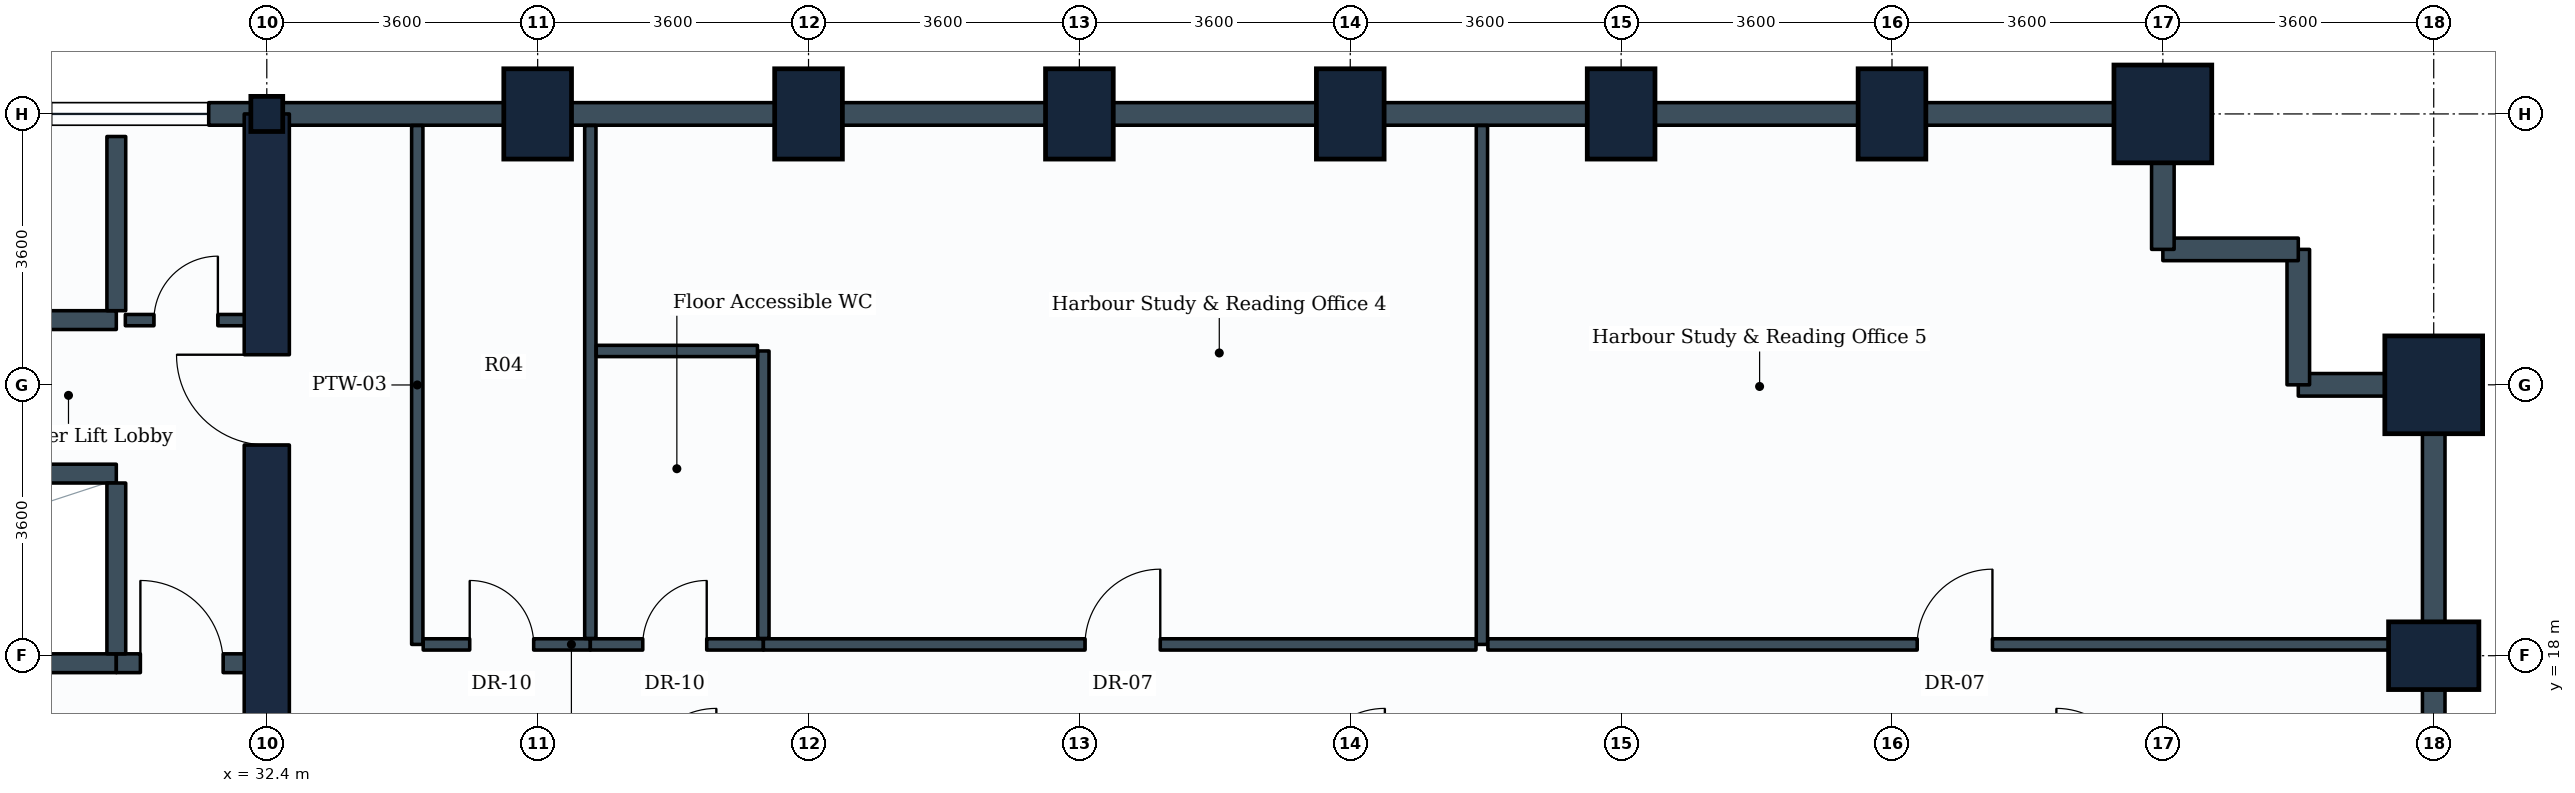
"""IFC4 building model, lengths in metres.
Left out: names, types, materials, properties, quantities, classifications, styles, units other than length and angle.
Written with IfcOpenShell. Run it as: python <this file> out.ifc"""

import sys

from ifc_helpers import new_model, si_unit, direction, frame, frame_2d, origin, origin_2d, place, context, subcontext, project, spatial, rectangle, i_section, extrude, element, fill, save


model = new_model("IFC4")
c1 = context("Model", 3, precision=1e-05, world=origin(), true_north=direction((0.0, 1.0)))
c2 = subcontext(c1, "Body", "Model", "MODEL_VIEW")
j1 = project(units=[si_unit("LENGTHUNIT", "METRE"), si_unit("PLANEANGLEUNIT", "RADIAN")], contexts=[c1])
p1 = place(None, origin())
s1 = spatial("IfcSite", under=j1, at=p1, CompositionType="ELEMENT")
p2 = place(p1, origin())
s2 = spatial("IfcBuilding", under=s1, at=p2, CompositionType="ELEMENT")
p3 = place(p2, frame((0.0, 0.0, 66.9)))
s3 = spatial("IfcBuildingStorey", under=s2, at=p3, CompositionType="ELEMENT", Elevation=66.9)
p4 = place(p3, frame((32.4, 25.2, 0.0), z_axis=(0.0, 0.0, 1.0), x_axis=(1.0, 0.0, 0.0)))
e1 = element("IfcColumn", 1, at=p4, inside=s3, PredefinedType="COLUMN", context=c2, shape_type="SweptSolid", body=[
    extrude(i_section(OverallWidth=0.424, OverallDepth=0.467, WebThickness=0.033, FlangeThickness=0.053, FilletRadius=0.015, at=origin_2d()), origin(), (0.0, 0.0, 1.0), 3.9),
])
for number, where, z_axis, x_axis in (
    (2, (36.0, 25.2, 0.0), (0.0, 0.0, 1.0), (1.0, 0.0, 0.0)),
    (3, (39.6, 25.2, 0.0), (0.0, 0.0, 1.0), (1.0, 0.0, 0.0)),
    (4, (43.2, 25.2, 0.0), (0.0, 0.0, 1.0), (1.0, 0.0, 0.0)),
    (5, (46.8, 25.2, 0.0), (0.0, 0.0, 1.0), (1.0, 0.0, 0.0)),
    (6, (50.4, 25.2, 0.0), (0.0, 0.0, 1.0), (1.0, 0.0, 0.0)),
    (7, (54.0, 25.2, 0.0), (0.0, 0.0, 1.0), (1.0, 0.0, 0.0)),
):
    element("IfcColumn", number, at=place(p3, frame(where, z_axis=z_axis, x_axis=x_axis)), inside=s3, PredefinedType="COLUMN", context=c2, shape_type="SweptSolid", body=[
        extrude(rectangle(XDim=0.9, YDim=1.2, at=origin_2d()), origin(), (0.0, 0.0, 1.0), 3.9),
    ])
p5 = place(p3, frame((57.6, 25.2, 0.0), z_axis=(0.0, 0.0, 1.0), x_axis=(1.0, 0.0, 0.0)))
e8 = element("IfcColumn", 8, at=p5, inside=s3, PredefinedType="COLUMN", context=c2, shape_type="SweptSolid", body=[
    extrude(rectangle(XDim=1.3, YDim=1.3, at=origin_2d()), origin(), (0.0, 0.0, 1.0), 3.9),
])
p6 = place(p3, frame((61.2, 18.0, 0.0), z_axis=(0.0, 0.0, 1.0), x_axis=(0.0, 1.0, 0.0)))
e9 = element("IfcColumn", 9, at=p6, inside=s3, PredefinedType="COLUMN", context=c2, shape_type="SweptSolid", body=[
    extrude(rectangle(XDim=0.9, YDim=1.2, at=origin_2d()), origin(), (0.0, 0.0, 1.0), 3.9),
])
p7 = place(p3, frame((61.2, 21.6, 0.0), z_axis=(0.0, 0.0, 1.0), x_axis=(0.0, 1.0, 0.0)))
e10 = element("IfcColumn", 10, at=p7, inside=s3, PredefinedType="COLUMN", context=c2, shape_type="SweptSolid", body=[
    extrude(rectangle(XDim=1.3, YDim=1.3, at=origin_2d()), origin(), (0.0, 0.0, 1.0), 3.9),
])
for number, where, z_axis, x_axis in (
    (11, (61.2, 18.0, 0.0), (0.0, 0.0, 1.0), (0.0, -1.0, 0.0)),
    (12, (61.2, 21.6, 0.0), (0.0, 0.0, 1.0), (0.0, -1.0, 0.0)),
):
    element("IfcWall", number, at=place(p3, frame(where, z_axis=z_axis, x_axis=x_axis)), inside=s3, PredefinedType="STANDARD", context=c2, shape_type="SweptSolid", body=[
        extrude(rectangle(XDim=3.6, YDim=0.3, at=frame_2d((1.8, 0.0))), origin(), (0.0, 0.0, 1.0), 2.93),
    ])
p8 = place(p3, frame((61.2, 21.6, 0.0), z_axis=(0.0, 0.0, 1.0), x_axis=(-1.0, 0.0, 0.0)))
e13 = element("IfcWall", 13, at=p8, inside=s3, PredefinedType="STANDARD", context=c2, shape_type="SweptSolid", body=[
    extrude(rectangle(XDim=1.8, YDim=0.3, at=frame_2d((0.9, 0.0))), origin(), (0.0, 0.0, 1.0), 2.93),
])
for number, where, z_axis, x_axis in (
    (14, (59.4, 23.4, 0.0), (0.0, 0.0, 1.0), (0.0, -1.0, 0.0)),
    (15, (57.6, 23.4, 0.0), (0.0, 0.0, 1.0), (1.0, 0.0, 0.0)),
):
    element("IfcWall", number, at=place(p3, frame(where, z_axis=z_axis, x_axis=x_axis)), inside=s3, PredefinedType="STANDARD", context=c2, shape_type="SweptSolid", body=[
        extrude(rectangle(XDim=1.8, YDim=0.3, at=frame_2d((0.9, 0.0))), origin(), (0.0, 0.0, 1.0), 3.635),
    ])
p9 = place(p3, frame((57.6, 25.2, 0.0), z_axis=(0.0, 0.0, 1.0), x_axis=(0.0, -1.0, 0.0)))
e16 = element("IfcWall", 16, at=p9, inside=s3, PredefinedType="STANDARD", context=c2, shape_type="SweptSolid", body=[
    extrude(rectangle(XDim=1.8, YDim=0.3, at=frame_2d((0.9, 0.0))), origin(), (0.0, 0.0, 1.0), 2.93),
])
for number, where, z_axis, x_axis in (
    (17, (54.0, 25.2, 0.0), (0.0, 0.0, 1.0), (1.0, 0.0, 0.0)),
    (18, (50.4, 25.2, 0.0), (0.0, 0.0, 1.0), (1.0, 0.0, 0.0)),
):
    element("IfcWall", number, at=place(p3, frame(where, z_axis=z_axis, x_axis=x_axis)), inside=s3, PredefinedType="STANDARD", context=c2, shape_type="SweptSolid", body=[
        extrude(rectangle(XDim=3.6, YDim=0.3, at=frame_2d((1.8, 0.0))), origin(), (0.0, 0.0, 1.0), 2.93),
    ])
p10 = place(p3, frame((46.8, 25.2, 0.0), z_axis=(0.0, 0.0, 1.0), x_axis=(1.0, 0.0, 0.0)))
e19 = element("IfcWall", 19, at=p10, inside=s3, PredefinedType="STANDARD", context=c2, shape_type="SweptSolid", body=[
    extrude(rectangle(XDim=3.6, YDim=0.3, at=frame_2d((1.8, 0.0))), origin(), (0.0, 0.0, 1.0), 2.93),
])
p11 = place(p3, frame((43.2, 25.2, 0.0), z_axis=(0.0, 0.0, 1.0), x_axis=(1.0, 0.0, 0.0)))
e20 = element("IfcWall", 20, at=p11, inside=s3, PredefinedType="STANDARD", context=c2, shape_type="SweptSolid", body=[
    extrude(rectangle(XDim=3.6, YDim=0.3, at=frame_2d((1.8, 0.0))), origin(), (0.0, 0.0, 1.0), 2.93),
])
p12 = place(p3, frame((39.6, 25.2, 0.0), z_axis=(0.0, 0.0, 1.0), x_axis=(1.0, 0.0, 0.0)))
e21 = element("IfcWall", 21, at=p12, inside=s3, PredefinedType="STANDARD", context=c2, shape_type="SweptSolid", body=[
    extrude(rectangle(XDim=3.6, YDim=0.3, at=frame_2d((1.8, 0.0))), origin(), (0.0, 0.0, 1.0), 2.93),
])
for number, where, z_axis, x_axis in (
    (22, (36.0, 25.2, 0.0), (0.0, 0.0, 1.0), (1.0, 0.0, 0.0)),
    (23, (32.4, 25.2, 0.0), (0.0, 0.0, 1.0), (1.0, 0.0, 0.0)),
):
    element("IfcWall", number, at=place(p3, frame(where, z_axis=z_axis, x_axis=x_axis)), inside=s3, PredefinedType="STANDARD", context=c2, shape_type="SweptSolid", body=[
        extrude(rectangle(XDim=3.6, YDim=0.3, at=frame_2d((1.8, 0.0))), origin(), (0.0, 0.0, 1.0), 2.93),
    ])
p13 = place(p3, frame((28.8, 25.2, 0.0), z_axis=(0.0, 0.0, 1.0), x_axis=(1.0, 0.0, 0.0)))
e24 = element("IfcWall", 24, at=p13, inside=s3, PredefinedType="STANDARD", context=c2, shape_type="SweptSolid", body=[
    extrude(rectangle(XDim=3.6, YDim=0.3, at=frame_2d((1.8, 0.0))), origin(), (0.0, 0.0, 1.0), 3.635),
])
p14 = place(p13, frame((0.728, 0.0, 0.85)))
e25 = element("IfcOpeningElement", 25, at=p14, cuts=e24, PredefinedType="OPENING", context=c2, shape_type="SweptSolid", body=[
    extrude(rectangle(XDim=2.1, YDim=1.35, at=frame_2d((1.05, 0.675))), frame((0.0, 0.16, 0.0), z_axis=(0.0, -1.0, 0.0), x_axis=(1.0, 0.0, 0.0)), (0.0, 0.0, 1.0), 0.32),
])
p15 = place(p3, frame((32.4, 10.8, 0.0), z_axis=(0.0, 0.0, 1.0), x_axis=(0.0, 1.0, 0.0)))
e26 = element("IfcWall", 26, at=p15, inside=s3, PredefinedType="SHEAR", context=c2, shape_type="SweptSolid", body=[
    extrude(rectangle(XDim=14.4, YDim=0.6, at=frame_2d((7.2, 0.0))), origin(), (0.0, 0.0, 1.0), 3.65),
])
p16 = place(p15, frame((4.35, 0.0, 0.0)))
e27 = element("IfcOpeningElement", 27, at=p16, cuts=e26, PredefinedType="OPENING", context=c2, shape_type="SweptSolid", body=[
    extrude(rectangle(XDim=1.2, YDim=2.1, at=frame_2d((0.6, 1.05))), frame((0.0, 0.31, 0.0), z_axis=(0.0, -1.0, 0.0), x_axis=(1.0, 0.0, 0.0)), (0.0, 0.0, 1.0), 0.62),
])
p17 = place(p15, frame((10.0, 0.0, 0.0)))
e28 = element("IfcOpeningElement", 28, at=p17, cuts=e26, PredefinedType="OPENING", context=c2, shape_type="SweptSolid", body=[
    extrude(rectangle(XDim=1.2, YDim=2.1, at=frame_2d((0.6, 1.05))), frame((0.0, 0.31, 0.0), z_axis=(0.0, -1.0, 0.0), x_axis=(1.0, 0.0, 0.0)), (0.0, 0.0, 1.0), 0.62),
])
p18 = place(p3, frame((21.88, 17.9, 0.0), z_axis=(0.0, 0.0, 1.0), x_axis=(1.0, 0.0, 0.0)))
e29 = element("IfcWall", 29, at=p18, inside=s3, PredefinedType="PARTITIONING", context=c2, shape_type="SweptSolid", body=[
    extrude(rectangle(XDim=8.52, YDim=0.25, at=frame_2d((4.26, 0.0))), origin(), (0.0, 0.0, 1.0), 3.635),
])
p19 = place(p3, frame((30.4, 17.9, 0.0), z_axis=(0.0, 0.0, 1.0), x_axis=(1.0, 0.0, 0.0)))
e30 = element("IfcWall", 30, at=p19, inside=s3, PredefinedType="PARTITIONING", context=c2, shape_type="SweptSolid", body=[
    extrude(rectangle(XDim=1.75, YDim=0.25, at=frame_2d((0.875, 0.0))), origin(), (0.0, 0.0, 1.0), 3.635),
])
p20 = place(p19, frame((0.32, 0.0, 0.0)))
e31 = element("IfcOpeningElement", 31, at=p20, cuts=e30, PredefinedType="OPENING", context=c2, shape_type="SweptSolid", body=[
    extrude(rectangle(XDim=1.1, YDim=2.1, at=frame_2d((0.55, 1.05))), frame((0.0, 0.135, 0.0), z_axis=(0.0, -1.0, 0.0), x_axis=(1.0, 0.0, 0.0)), (0.0, 0.0, 1.0), 0.27),
])
p21 = place(p3, frame((23.18, 20.42, 0.0), z_axis=(0.0, 0.0, 1.0), x_axis=(1.0, 0.0, 0.0)))
e32 = element("IfcWall", 32, at=p21, inside=s3, PredefinedType="PARTITIONING", context=c2, shape_type="SweptSolid", body=[
    extrude(rectangle(XDim=7.22, YDim=0.25, at=frame_2d((3.61, 0.0))), origin(), (0.0, 0.0, 1.0), 3.635),
])
p22 = place(p3, frame((30.4, 18.025, 0.0), z_axis=(0.0, 0.0, 1.0), x_axis=(0.0, 1.0, 0.0)))
e33 = element("IfcWall", 33, at=p22, inside=s3, PredefinedType="PARTITIONING", context=c2, shape_type="SweptSolid", body=[
    extrude(rectangle(XDim=2.27, YDim=0.25, at=frame_2d((1.135, 0.0))), origin(), (0.0, 0.0, 1.0), 3.635),
])
p23 = place(p3, frame((23.18, 22.46, 0.0), z_axis=(0.0, 0.0, 1.0), x_axis=(1.0, 0.0, 0.0)))
e34 = element("IfcWall", 34, at=p23, inside=s3, PredefinedType="PARTITIONING", context=c2, shape_type="SweptSolid", body=[
    extrude(rectangle(XDim=7.22, YDim=0.25, at=frame_2d((3.61, 0.0))), origin(), (0.0, 0.0, 1.0), 3.635),
])
p24 = place(p3, frame((30.4, 22.585, 0.0), z_axis=(0.0, 0.0, 1.0), x_axis=(0.0, 1.0, 0.0)))
e35 = element("IfcWall", 35, at=p24, inside=s3, PredefinedType="PARTITIONING", context=c2, shape_type="SweptSolid", body=[
    extrude(rectangle(XDim=2.315, YDim=0.25, at=frame_2d((1.157, 0.0))), origin(), (0.0, 0.0, 1.0), 3.635),
])
p25 = place(p3, frame((30.52, 22.46, 0.0), z_axis=(0.0, 0.0, 1.0), x_axis=(1.0, 0.0, 0.0)))
e36 = element("IfcWall", 36, at=p25, inside=s3, PredefinedType="PARTITIONING", context=c2, shape_type="SweptSolid", body=[
    extrude(rectangle(XDim=1.63, YDim=0.15, at=frame_2d((0.815, 0.0))), origin(), (0.0, 0.0, 1.0), 3.635),
])
p26 = place(p25, frame((0.38, 0.0, 0.0)))
e37 = element("IfcOpeningElement", 37, at=p26, cuts=e36, PredefinedType="OPENING", context=c2, shape_type="SweptSolid", body=[
    extrude(rectangle(XDim=0.85, YDim=2.1, at=frame_2d((0.425, 1.05))), frame((0.0, 0.085, 0.0), z_axis=(0.0, -1.0, 0.0), x_axis=(1.0, 0.0, 0.0)), (0.0, 0.0, 1.0), 0.17),
])
p27 = place(p3, frame((34.4, 18.15, 0.0), z_axis=(0.0, 0.0, 1.0), x_axis=(0.0, 1.0, 0.0)))
e38 = element("IfcWall", 38, at=p27, inside=s3, PredefinedType="PARTITIONING", context=c2, shape_type="SweptSolid", body=[
    extrude(rectangle(XDim=6.896, YDim=0.15, at=frame_2d((3.448, 0.0))), origin(), (0.0, 0.0, 1.0), 2.93),
])
p28 = place(p3, frame((34.479, 18.15, 0.0), z_axis=(0.0, 0.0, 1.0), x_axis=(1.0, 0.0, 0.0)))
e39 = element("IfcWall", 39, at=p28, inside=s3, PredefinedType="PARTITIONING", context=c2, shape_type="SweptSolid", body=[
    extrude(rectangle(XDim=2.221, YDim=0.15, at=frame_2d((1.11, 0.0))), origin(), (0.0, 0.0, 1.0), 3.08),
])
p29 = place(p28, frame((0.618, 0.0, 0.0)))
e40 = element("IfcOpeningElement", 40, at=p29, cuts=e39, PredefinedType="OPENING", context=c2, shape_type="SweptSolid", body=[
    extrude(rectangle(XDim=0.85, YDim=2.1, at=frame_2d((0.425, 1.05))), frame((0.0, 0.085, 0.0), z_axis=(0.0, -1.0, 0.0), x_axis=(1.0, 0.0, 0.0)), (0.0, 0.0, 1.0), 0.17),
])
p30 = place(p3, frame((36.7, 18.229, 0.0), z_axis=(0.0, 0.0, 1.0), x_axis=(0.0, 1.0, 0.0)))
e41 = element("IfcWall", 41, at=p30, inside=s3, PredefinedType="PARTITIONING", context=c2, shape_type="SweptSolid", body=[
    extrude(rectangle(XDim=6.817, YDim=0.15, at=frame_2d((3.408, 0.0))), origin(), (0.0, 0.0, 1.0), 2.93),
])
p31 = place(p3, frame((36.7, 18.15, 0.0), z_axis=(0.0, 0.0, 1.0), x_axis=(1.0, 0.0, 0.0)))
e42 = element("IfcWall", 42, at=p31, inside=s3, PredefinedType="PARTITIONING", context=c2, shape_type="SweptSolid", body=[
    extrude(rectangle(XDim=2.3, YDim=0.15, at=frame_2d((1.15, 0.0))), origin(), (0.0, 0.0, 1.0), 3.08),
])
p32 = place(p31, frame((0.697, 0.0, 0.0)))
e43 = element("IfcOpeningElement", 43, at=p32, cuts=e42, PredefinedType="OPENING", context=c2, shape_type="SweptSolid", body=[
    extrude(rectangle(XDim=0.85, YDim=2.1, at=frame_2d((0.425, 1.05))), frame((0.0, 0.085, 0.0), z_axis=(0.0, -1.0, 0.0), x_axis=(1.0, 0.0, 0.0)), (0.0, 0.0, 1.0), 0.17),
])
p33 = place(p3, frame((39.0, 18.229, 0.0), z_axis=(0.0, 0.0, 1.0), x_axis=(0.0, 1.0, 0.0)))
e44 = element("IfcWall", 44, at=p33, inside=s3, PredefinedType="PARTITIONING", context=c2, shape_type="SweptSolid", body=[
    extrude(rectangle(XDim=3.821, YDim=0.15, at=frame_2d((1.911, 0.0))), origin(), (0.0, 0.0, 1.0), 3.03),
])
p34 = place(p3, frame((36.779, 22.05, 0.0), z_axis=(0.0, 0.0, 1.0), x_axis=(1.0, 0.0, 0.0)))
e45 = element("IfcWall", 45, at=p34, inside=s3, PredefinedType="PARTITIONING", context=c2, shape_type="SweptSolid", body=[
    extrude(rectangle(XDim=2.142, YDim=0.15, at=frame_2d((1.071, 0.0))), origin(), (0.0, 0.0, 1.0), 3.635),
])
p35 = place(p3, frame((48.55, 18.15, 0.0), z_axis=(0.0, 0.0, 1.0), x_axis=(0.0, 1.0, 0.0)))
e46 = element("IfcWall", 46, at=p35, inside=s3, PredefinedType="PARTITIONING", context=c2, shape_type="SweptSolid", body=[
    extrude(rectangle(XDim=6.896, YDim=0.15, at=frame_2d((3.448, 0.0))), origin(), (0.0, 0.0, 1.0), 2.93),
])
p36 = place(p3, frame((39.0, 18.15, 0.0), z_axis=(0.0, 0.0, 1.0), x_axis=(1.0, 0.0, 0.0)))
e47 = element("IfcWall", 47, at=p36, inside=s3, PredefinedType="PARTITIONING", context=c2, shape_type="SweptSolid", body=[
    extrude(rectangle(XDim=9.471, YDim=0.15, at=frame_2d((4.735, 0.0))), origin(), (0.0, 0.0, 1.0), 3.03),
])
p37 = place(p36, frame((4.275, 0.0, 0.0)))
e48 = element("IfcOpeningElement", 48, at=p37, cuts=e47, PredefinedType="OPENING", context=c2, shape_type="SweptSolid", body=[
    extrude(rectangle(XDim=1.0, YDim=2.1, at=frame_2d((0.5, 1.05))), frame((0.0, 0.085, 0.0), z_axis=(0.0, -1.0, 0.0), x_axis=(1.0, 0.0, 0.0)), (0.0, 0.0, 1.0), 0.17),
])
p38 = place(p3, frame((48.629, 18.15, 0.0), z_axis=(0.0, 0.0, 1.0), x_axis=(1.0, 0.0, 0.0)))
e49 = element("IfcWall", 49, at=p38, inside=s3, PredefinedType="PARTITIONING", context=c2, shape_type="SweptSolid", body=[
    extrude(rectangle(XDim=12.417, YDim=0.15, at=frame_2d((6.208, 0.0))), origin(), (0.0, 0.0, 1.0), 2.93),
])
p39 = place(p38, frame((5.706, 0.0, 0.0)))
e50 = element("IfcOpeningElement", 50, at=p39, cuts=e49, PredefinedType="OPENING", context=c2, shape_type="SweptSolid", body=[
    extrude(rectangle(XDim=1.0, YDim=2.1, at=frame_2d((0.5, 1.05))), frame((0.0, 0.085, 0.0), z_axis=(0.0, -1.0, 0.0), x_axis=(1.0, 0.0, 0.0)), (0.0, 0.0, 1.0), 0.17),
])
p40 = place(p14, origin())
e51 = element("IfcWindow", 51, at=p40, inside=s3, PartitioningType="SINGLE_PANEL", PredefinedType="WINDOW", context=c2, shape_type="SweptSolid", body=[
    extrude(rectangle(XDim=2.1, YDim=1.35, at=frame_2d((1.05, 0.675))), frame((0.0, 0.03, 0.0), z_axis=(0.0, -1.0, 0.0), x_axis=(1.0, 0.0, 0.0)), (0.0, 0.0, 1.0), 0.06),
])
fill(e25, e51)
p41 = place(p20, origin())
e52 = element("IfcDoor", 52, at=p41, inside=s3, OperationType="SINGLE_SWING_LEFT", PredefinedType="DOOR", context=c2, shape_type="SweptSolid", body=[
    extrude(rectangle(XDim=1.1, YDim=2.1, at=frame_2d((0.55, 1.05))), frame((0.0, 0.025, 0.0), z_axis=(0.0, -1.0, 0.0), x_axis=(1.0, 0.0, 0.0)), (0.0, 0.0, 1.0), 0.05),
])
fill(e31, e52)
p42 = place(p17, origin())
e53 = element("IfcDoor", 53, at=p42, inside=s3, OperationType="SINGLE_SWING_RIGHT", PredefinedType="DOOR", context=c2, shape_type="SweptSolid", body=[
    extrude(rectangle(XDim=1.2, YDim=2.1, at=frame_2d((0.6, 1.05))), frame((0.0, 0.025, 0.0), z_axis=(0.0, -1.0, 0.0), x_axis=(1.0, 0.0, 0.0)), (0.0, 0.0, 1.0), 0.05),
])
fill(e28, e53)
p43 = place(p26, origin())
e54 = element("IfcDoor", 54, at=p43, inside=s3, OperationType="SINGLE_SWING_RIGHT", PredefinedType="DOOR", context=c2, shape_type="SweptSolid", body=[
    extrude(rectangle(XDim=0.85, YDim=2.1, at=frame_2d((0.425, 1.05))), frame((0.0, 0.025, 0.0), z_axis=(0.0, -1.0, 0.0), x_axis=(1.0, 0.0, 0.0)), (0.0, 0.0, 1.0), 0.05),
])
fill(e37, e54)
p44 = place(p29, origin())
e55 = element("IfcDoor", 55, at=p44, inside=s3, OperationType="SINGLE_SWING_LEFT", PredefinedType="DOOR", context=c2, shape_type="SweptSolid", body=[
    extrude(rectangle(XDim=0.85, YDim=2.1, at=frame_2d((0.425, 1.05))), frame((0.0, 0.025, 0.0), z_axis=(0.0, -1.0, 0.0), x_axis=(1.0, 0.0, 0.0)), (0.0, 0.0, 1.0), 0.05),
])
fill(e40, e55)
p45 = place(p32, origin())
e56 = element("IfcDoor", 56, at=p45, inside=s3, OperationType="SINGLE_SWING_RIGHT", PredefinedType="DOOR", context=c2, shape_type="SweptSolid", body=[
    extrude(rectangle(XDim=0.85, YDim=2.1, at=frame_2d((0.425, 1.05))), frame((0.0, 0.025, 0.0), z_axis=(0.0, -1.0, 0.0), x_axis=(1.0, 0.0, 0.0)), (0.0, 0.0, 1.0), 0.05),
])
fill(e43, e56)
p46 = place(p37, origin())
e57 = element("IfcDoor", 57, at=p46, inside=s3, OperationType="SINGLE_SWING_RIGHT", PredefinedType="DOOR", context=c2, shape_type="SweptSolid", body=[
    extrude(rectangle(XDim=1.0, YDim=2.1, at=frame_2d((0.5, 1.05))), frame((0.0, 0.025, 0.0), z_axis=(0.0, -1.0, 0.0), x_axis=(1.0, 0.0, 0.0)), (0.0, 0.0, 1.0), 0.05),
])
fill(e48, e57)
p47 = place(p39, origin())
e58 = element("IfcDoor", 58, at=p47, inside=s3, OperationType="SINGLE_SWING_RIGHT", PredefinedType="DOOR", context=c2, shape_type="SweptSolid", body=[
    extrude(rectangle(XDim=1.0, YDim=2.1, at=frame_2d((0.5, 1.05))), frame((0.0, 0.025, 0.0), z_axis=(0.0, -1.0, 0.0), x_axis=(1.0, 0.0, 0.0)), (0.0, 0.0, 1.0), 0.05),
])
fill(e50, e58)
save(model, sys.argv[1])
